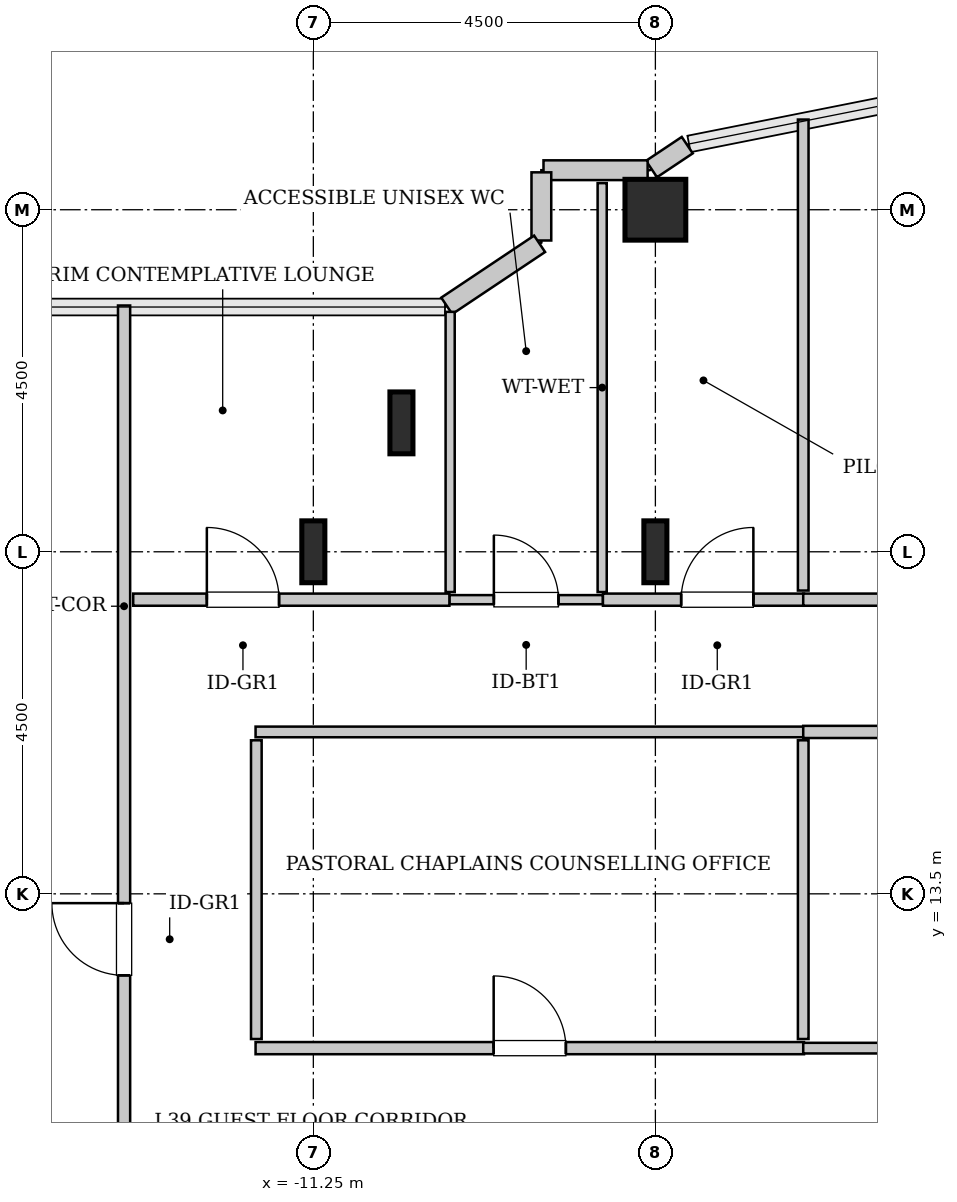
"""IFC4 building model, lengths in metres.
Left out: names, types, materials, properties, quantities, classifications, styles, units other than length and angle.
Written with IfcOpenShell. Run it as: python <this file> out.ifc"""

import sys

from ifc_helpers import new_model, si_unit, direction, frame, frame_2d, origin, origin_2d, place, context, subcontext, project, spatial, rectangle, hollow_rectangle, i_section, extrude, source, transform, mapped, element, fill, save


model = new_model("IFC4")
c1 = context("Model", 3, precision=1e-05, world=origin(), true_north=direction((0.0, 1.0)))
c2 = subcontext(c1, "Body", "Model", "MODEL_VIEW")
j1 = project(units=[si_unit("LENGTHUNIT", "METRE"), si_unit("PLANEANGLEUNIT", "RADIAN")], contexts=[c1])
p1 = place(None, origin())
s1 = spatial("IfcSite", under=j1, at=p1, CompositionType="ELEMENT")
p2 = place(p1, origin())
s2 = spatial("IfcBuilding", under=s1, at=p2, CompositionType="ELEMENT")
p3 = place(p2, frame((0.0, 0.0, 160.2)))
s3 = spatial("IfcBuildingStorey", under=s2, at=p3, CompositionType="ELEMENT", Elevation=160.2)
m1 = source(origin(), c2, "Body", "SweptSolid", [
    extrude(i_section(OverallWidth=0.303, OverallDepth=0.814, WebThickness=0.021, FlangeThickness=0.04, FilletRadius=0.03, at=origin_2d()), origin(), (0.0, 0.0, 1.0), 3.8),
])
for number, where, z_axis, x_axis in (
    (1, (-11.25, 18.0, 0.0), (0.0, 0.0, 1.0), (1.0, 0.0, 0.0)),
    (2, (-10.091, 19.696, 0.0), (0.0, 0.0, 1.0), (1.0, 0.0, 0.0)),
    (3, (-6.75, 18.0, 0.0), (0.0, 0.0, 1.0), (1.0, 0.0, 0.0)),
):
    element("IfcColumn", number, at=place(p3, frame(where, z_axis=z_axis, x_axis=x_axis)), inside=s3, PredefinedType="COLUMN", context=c2, shape_type="MappedRepresentation", body=[
        mapped(m1, transform((0.0, 0.0, 0.0), x_axis=(1.0, 0.0, 0.0), y_axis=(0.0, 1.0, 0.0), z_axis=(0.0, 0.0, 1.0), scale=1.0)),
    ])
m2 = source(origin(), c2, "Body", "SweptSolid", [
    extrude(hollow_rectangle(XDim=0.8, YDim=0.8, WallThickness=0.04, InnerFilletRadius=0.04, OuterFilletRadius=0.08, at=origin_2d()), origin(), (0.0, 0.0, 1.0), 3.8),
])
p4 = place(p3, frame((-6.75, 22.5, 0.0), z_axis=(0.0, 0.0, 1.0), x_axis=(1.0, 0.0, 0.0)))
e4 = element("IfcColumn", 4, at=p4, inside=s3, PredefinedType="COLUMN", context=c2, shape_type="MappedRepresentation", body=[
    mapped(m2, transform((0.0, 0.0, 0.0), x_axis=(1.0, 0.0, 0.0), y_axis=(0.0, 1.0, 0.0), z_axis=(0.0, 0.0, 1.0), scale=1.0)),
])
m3 = source(origin(), c2, "Body", "SweptSolid", [
    extrude(rectangle(XDim=0.565, YDim=0.26, at=frame_2d((0.283, 0.0))), origin(), (0.0, 0.0, 1.0), 3.55),
])
p5 = place(p3, frame((-6.331, 23.35, 0.0), z_axis=(0.0, 0.0, 1.0), x_axis=(-0.831651492666, -0.555297933317, 0.0)))
e5 = element("IfcWall", 5, at=p5, inside=s3, PredefinedType="SOLIDWALL", context=c2, shape_type="MappedRepresentation", body=[
    mapped(m3, transform((0.0, 0.0, 0.0), x_axis=(1.0, 0.0, 0.0), y_axis=(0.0, 1.0, 0.0), z_axis=(0.0, 0.0, 1.0), scale=1.0)),
])
m4 = source(origin(), c2, "Body", "SweptSolid", [
    extrude(rectangle(XDim=1.37, YDim=0.26, at=frame_2d((0.685, 0.0))), origin(), (0.0, 0.0, 1.0), 3.55),
])
p6 = place(p3, frame((-6.852, 23.02, 0.0), z_axis=(0.0, 0.0, 1.0), x_axis=(-1.0, 0.0, 0.0)))
e6 = element("IfcWall", 6, at=p6, inside=s3, PredefinedType="SOLIDWALL", context=c2, shape_type="MappedRepresentation", body=[
    mapped(m4, transform((0.0, 0.0, 0.0), x_axis=(1.0, 0.0, 0.0), y_axis=(0.0, 1.0, 0.0), z_axis=(0.0, 0.0, 1.0), scale=1.0)),
])
m5 = source(origin(), c2, "Body", "SweptSolid", [
    extrude(rectangle(XDim=0.897, YDim=0.26, at=frame_2d((0.448, 0.0))), origin(), (0.0, 0.0, 1.0), 3.55),
])
p7 = place(p3, frame((-8.25, 22.992, 0.0), z_axis=(0.0, 0.0, 1.0), x_axis=(0.0, -1.0, 0.0)))
e7 = element("IfcWall", 7, at=p7, inside=s3, PredefinedType="SOLIDWALL", context=c2, shape_type="MappedRepresentation", body=[
    mapped(m5, transform((0.0, 0.0, 0.0), x_axis=(1.0, 0.0, 0.0), y_axis=(0.0, 1.0, 0.0), z_axis=(0.0, 0.0, 1.0), scale=1.0)),
])
m6 = source(origin(), c2, "Body", "SweptSolid", [
    extrude(rectangle(XDim=1.469, YDim=0.26, at=frame_2d((0.734, 0.0))), origin(), (0.0, 0.0, 1.0), 3.55),
])
p8 = place(p3, frame((-8.273, 22.052, 0.0), z_axis=(0.0, 0.0, 1.0), x_axis=(-0.831461760506, -0.555581983884, 0.0)))
e8 = element("IfcWall", 8, at=p8, inside=s3, PredefinedType="SOLIDWALL", context=c2, shape_type="MappedRepresentation", body=[
    mapped(m6, transform((0.0, 0.0, 0.0), x_axis=(1.0, 0.0, 0.0), y_axis=(0.0, 1.0, 0.0), z_axis=(0.0, 0.0, 1.0), scale=1.0)),
])
m7 = source(origin(), c2, "Body", "SweptSolid", [
    extrude(rectangle(XDim=2.02, YDim=0.12, at=frame_2d((1.01, 0.0))), origin(), (0.0, 0.0, 1.0), 3.535),
])
p9 = place(p3, frame((-9.46, 17.37, 0.0), z_axis=(0.0, 0.0, 1.0), x_axis=(1.0, 0.0, 0.0)))
e9 = element("IfcWall", 9, at=p9, inside=s3, PredefinedType="PLUMBINGWALL", context=c2, shape_type="MappedRepresentation", body=[
    mapped(m7, transform((0.0, 0.0, 0.0), x_axis=(1.0, 0.0, 0.0), y_axis=(0.0, 1.0, 0.0), z_axis=(0.0, 0.0, 1.0), scale=1.0)),
])
p10 = place(p9, frame((0.585, 0.0, 0.0)))
e10 = element("IfcOpeningElement", 10, at=p10, cuts=e9, PredefinedType="OPENING", context=c2, shape_type="SweptSolid", body=[
    extrude(rectangle(XDim=0.85, YDim=2.1, at=frame_2d((0.425, 1.05))), frame((0.0, 0.07, 0.0), z_axis=(0.0, -1.0, 0.0), x_axis=(1.0, 0.0, 0.0)), (0.0, 0.0, 1.0), 0.14),
])
m8 = source(origin(), c2, "Body", "SweptSolid", [
    extrude(rectangle(XDim=5.38, YDim=0.12, at=frame_2d((2.69, 0.0))), origin(), (0.0, 0.0, 1.0), 3.535),
])
p11 = place(p3, frame((-7.45, 17.47, 0.0), z_axis=(0.0, 0.0, 1.0), x_axis=(0.0, 1.0, 0.0)))
e11 = element("IfcWall", 11, at=p11, inside=s3, PredefinedType="PLUMBINGWALL", context=c2, shape_type="MappedRepresentation", body=[
    mapped(m8, transform((0.0, 0.0, 0.0), x_axis=(1.0, 0.0, 0.0), y_axis=(0.0, 1.0, 0.0), z_axis=(0.0, 0.0, 1.0), scale=1.0)),
])
m9 = source(origin(), c2, "Body", "SweptSolid", [
    extrude(rectangle(XDim=3.687, YDim=0.12, at=frame_2d((1.843, 0.0))), origin(), (0.0, 0.0, 1.0), 3.535),
])
p12 = place(p3, frame((-9.45, 17.47, 0.0), z_axis=(0.0, 0.0, 1.0), x_axis=(0.0, 1.0, 0.0)))
e12 = element("IfcWall", 12, at=p12, inside=s3, PredefinedType="PLUMBINGWALL", context=c2, shape_type="MappedRepresentation", body=[
    mapped(m9, transform((0.0, 0.0, 0.0), x_axis=(1.0, 0.0, 0.0), y_axis=(0.0, 1.0, 0.0), z_axis=(0.0, 0.0, 1.0), scale=1.0)),
])
m10 = source(origin(), c2, "Body", "SweptSolid", [
    extrude(rectangle(XDim=12.845, YDim=0.16, at=frame_2d((6.422, 0.0))), origin(), (0.0, 0.0, 1.0), 3.535),
])
p13 = place(p3, frame((-13.74, 8.395, 0.0), z_axis=(0.0, 0.0, 1.0), x_axis=(0.0, 1.0, 0.0)))
e13 = element("IfcWall", 13, at=p13, inside=s3, PredefinedType="PARTITIONING", context=c2, shape_type="MappedRepresentation", body=[
    mapped(m10, transform((0.0, 0.0, 0.0), x_axis=(1.0, 0.0, 0.0), y_axis=(0.0, 1.0, 0.0), z_axis=(0.0, 0.0, 1.0), scale=1.0)),
])
p14 = place(p13, frame((4.032, 0.0, 0.0)))
e14 = element("IfcOpeningElement", 14, at=p14, cuts=e13, PredefinedType="OPENING", context=c2, shape_type="SweptSolid", body=[
    extrude(rectangle(XDim=0.95, YDim=2.1, at=frame_2d((0.475, 1.05))), frame((0.0, 0.09, 0.0), z_axis=(0.0, -1.0, 0.0), x_axis=(1.0, 0.0, 0.0)), (0.0, 0.0, 1.0), 0.18),
])
m11 = source(origin(), c2, "Body", "SweptSolid", [
    extrude(rectangle(XDim=7.215, YDim=0.16, at=frame_2d((3.607, 0.0))), origin(), (0.0, 0.0, 1.0), 3.535),
])
p15 = place(p3, frame((-12.01, 11.47, 0.0), z_axis=(0.0, 0.0, 1.0), x_axis=(1.0, 0.0, 0.0)))
e15 = element("IfcWall", 15, at=p15, inside=s3, PredefinedType="PARTITIONING", context=c2, shape_type="MappedRepresentation", body=[
    mapped(m11, transform((0.0, 0.0, 0.0), x_axis=(1.0, 0.0, 0.0), y_axis=(0.0, 1.0, 0.0), z_axis=(0.0, 0.0, 1.0), scale=1.0)),
])
p16 = place(p15, frame((3.133, 0.0, 0.0)))
e16 = element("IfcOpeningElement", 16, at=p16, cuts=e15, PredefinedType="OPENING", context=c2, shape_type="SweptSolid", body=[
    extrude(rectangle(XDim=0.95, YDim=2.1, at=frame_2d((0.475, 1.05))), frame((0.0, 0.09, 0.0), z_axis=(0.0, -1.0, 0.0), x_axis=(1.0, 0.0, 0.0)), (0.0, 0.0, 1.0), 0.18),
])
m12 = source(origin(), c2, "Body", "SweptSolid", [
    extrude(rectangle(XDim=7.215, YDim=0.14, at=frame_2d((3.607, 0.0))), origin(), (0.0, 0.0, 1.0), 3.535),
])
p17 = place(p3, frame((-12.01, 15.63, 0.0), z_axis=(0.0, 0.0, 1.0), x_axis=(1.0, 0.0, 0.0)))
e17 = element("IfcWall", 17, at=p17, inside=s3, PredefinedType="PARTITIONING", context=c2, shape_type="MappedRepresentation", body=[
    mapped(m12, transform((0.0, 0.0, 0.0), x_axis=(1.0, 0.0, 0.0), y_axis=(0.0, 1.0, 0.0), z_axis=(0.0, 0.0, 1.0), scale=1.0)),
])
m13 = source(origin(), c2, "Body", "SweptSolid", [
    extrude(rectangle(XDim=3.93, YDim=0.14, at=frame_2d((1.965, 0.0))), origin(), (0.0, 0.0, 1.0), 3.535),
])
for number, where, z_axis, x_axis in (
    (18, (-12.0, 11.59, 0.0), (0.0, 0.0, 1.0), (0.0, 1.0, 0.0)),
    (19, (-4.805, 11.59, 0.0), (0.0, 0.0, 1.0), (0.0, 1.0, 0.0)),
):
    element("IfcWall", number, at=place(p3, frame(where, z_axis=z_axis, x_axis=x_axis)), inside=s3, PredefinedType="PARTITIONING", context=c2, shape_type="MappedRepresentation", body=[
        mapped(m13, transform((0.0, 0.0, 0.0), x_axis=(1.0, 0.0, 0.0), y_axis=(0.0, 1.0, 0.0), z_axis=(0.0, 0.0, 1.0), scale=1.0)),
    ])
m14 = source(origin(), c2, "Body", "SweptSolid", [
    extrude(rectangle(XDim=2.645, YDim=0.16, at=frame_2d((1.323, 0.0))), origin(), (0.0, 0.0, 1.0), 3.535),
])
p18 = place(p3, frame((-7.44, 17.37, 0.0), z_axis=(0.0, 0.0, 1.0), x_axis=(1.0, 0.0, 0.0)))
e20 = element("IfcWall", 20, at=p18, inside=s3, PredefinedType="PARTITIONING", context=c2, shape_type="MappedRepresentation", body=[
    mapped(m14, transform((0.0, 0.0, 0.0), x_axis=(1.0, 0.0, 0.0), y_axis=(0.0, 1.0, 0.0), z_axis=(0.0, 0.0, 1.0), scale=1.0)),
])
p19 = place(p18, frame((1.029, 0.0, 0.0)))
e21 = element("IfcOpeningElement", 21, at=p19, cuts=e20, PredefinedType="OPENING", context=c2, shape_type="SweptSolid", body=[
    extrude(rectangle(XDim=0.95, YDim=2.1, at=frame_2d((0.475, 1.05))), frame((0.0, 0.09, 0.0), z_axis=(0.0, -1.0, 0.0), x_axis=(1.0, 0.0, 0.0)), (0.0, 0.0, 1.0), 0.18),
])
m15 = source(origin(), c2, "Body", "SweptSolid", [
    extrude(rectangle(XDim=6.197, YDim=0.14, at=frame_2d((3.098, 0.0))), origin(), (0.0, 0.0, 1.0), 3.535),
])
p20 = place(p3, frame((-4.805, 17.49, 0.0), z_axis=(0.0, 0.0, 1.0), x_axis=(0.0, 1.0, 0.0)))
e22 = element("IfcWall", 22, at=p20, inside=s3, PredefinedType="PARTITIONING", context=c2, shape_type="MappedRepresentation", body=[
    mapped(m15, transform((0.0, 0.0, 0.0), x_axis=(1.0, 0.0, 0.0), y_axis=(0.0, 1.0, 0.0), z_axis=(0.0, 0.0, 1.0), scale=1.0)),
])
m16 = source(origin(), c2, "Body", "SweptSolid", [
    extrude(rectangle(XDim=4.16, YDim=0.16, at=frame_2d((2.08, 0.0))), origin(), (0.0, 0.0, 1.0), 3.535),
])
p21 = place(p3, frame((-13.62, 17.37, 0.0), z_axis=(0.0, 0.0, 1.0), x_axis=(1.0, 0.0, 0.0)))
e23 = element("IfcWall", 23, at=p21, inside=s3, PredefinedType="PARTITIONING", context=c2, shape_type="MappedRepresentation", body=[
    mapped(m16, transform((0.0, 0.0, 0.0), x_axis=(1.0, 0.0, 0.0), y_axis=(0.0, 1.0, 0.0), z_axis=(0.0, 0.0, 1.0), scale=1.0)),
])
p22 = place(p21, frame((0.969, 0.0, 0.0)))
e24 = element("IfcOpeningElement", 24, at=p22, cuts=e23, PredefinedType="OPENING", context=c2, shape_type="SweptSolid", body=[
    extrude(rectangle(XDim=0.95, YDim=2.1, at=frame_2d((0.475, 1.05))), frame((0.0, 0.09, 0.0), z_axis=(0.0, -1.0, 0.0), x_axis=(1.0, 0.0, 0.0)), (0.0, 0.0, 1.0), 0.18),
])
m17 = source(origin(), c2, "Body", "SweptSolid", [
    extrude(rectangle(XDim=11.61, YDim=0.16, at=frame_2d((5.805, 0.0))), origin(), (0.0, 0.0, 1.0), 3.535),
])
p23 = place(p3, frame((-4.805, 17.37, 0.0), z_axis=(0.0, 0.0, 1.0), x_axis=(1.0, 0.0, 0.0)))
e25 = element("IfcWall", 25, at=p23, inside=s3, PredefinedType="PARTITIONING", context=c2, shape_type="MappedRepresentation", body=[
    mapped(m17, transform((0.0, 0.0, 0.0), x_axis=(1.0, 0.0, 0.0), y_axis=(0.0, 1.0, 0.0), z_axis=(0.0, 0.0, 1.0), scale=1.0)),
])
p24 = place(p23, frame((5.33, 0.0, 0.0)))
e26 = element("IfcOpeningElement", 26, at=p24, cuts=e25, PredefinedType="OPENING", context=c2, shape_type="SweptSolid", body=[
    extrude(rectangle(XDim=0.95, YDim=2.1, at=frame_2d((0.475, 1.05))), frame((0.0, 0.09, 0.0), z_axis=(0.0, -1.0, 0.0), x_axis=(1.0, 0.0, 0.0)), (0.0, 0.0, 1.0), 0.18),
])
p25 = place(p3, frame((-4.805, 15.63, 0.0), z_axis=(0.0, 0.0, 1.0), x_axis=(1.0, 0.0, 0.0)))
e27 = element("IfcWall", 27, at=p25, inside=s3, PredefinedType="PARTITIONING", context=c2, shape_type="MappedRepresentation", body=[
    mapped(m17, transform((0.0, 0.0, 0.0), x_axis=(1.0, 0.0, 0.0), y_axis=(0.0, 1.0, 0.0), z_axis=(0.0, 0.0, 1.0), scale=1.0)),
])
p26 = place(p25, frame((5.33, 0.0, 0.0)))
e28 = element("IfcOpeningElement", 28, at=p26, cuts=e27, PredefinedType="OPENING", context=c2, shape_type="SweptSolid", body=[
    extrude(rectangle(XDim=0.95, YDim=2.1, at=frame_2d((0.475, 1.05))), frame((0.0, 0.09, 0.0), z_axis=(0.0, -1.0, 0.0), x_axis=(1.0, 0.0, 0.0)), (0.0, 0.0, 1.0), 0.18),
])
m18 = source(origin(), c2, "Body", "SweptSolid", [
    extrude(rectangle(XDim=11.61, YDim=0.14, at=frame_2d((5.805, 0.0))), origin(), (0.0, 0.0, 1.0), 3.535),
])
p27 = place(p3, frame((-4.805, 11.47, 0.0), z_axis=(0.0, 0.0, 1.0), x_axis=(1.0, 0.0, 0.0)))
e29 = element("IfcWall", 29, at=p27, inside=s3, PredefinedType="PARTITIONING", context=c2, shape_type="MappedRepresentation", body=[
    mapped(m18, transform((0.0, 0.0, 0.0), x_axis=(1.0, 0.0, 0.0), y_axis=(0.0, 1.0, 0.0), z_axis=(0.0, 0.0, 1.0), scale=1.0)),
])
m19 = source(origin(), c2, "Body", "SweptSolid", [
    extrude(rectangle(XDim=0.85, YDim=2.1, at=frame_2d((0.425, 1.05))), frame((0.0, 0.025, 0.0), z_axis=(0.0, -1.0, 0.0), x_axis=(1.0, 0.0, 0.0)), (0.0, 0.0, 1.0), 0.05),
])
p28 = place(p10, origin())
e30 = element("IfcDoor", 30, at=p28, inside=s3, OperationType="SINGLE_SWING_LEFT", PredefinedType="DOOR", context=c2, shape_type="MappedRepresentation", body=[
    mapped(m19, transform((0.0, 0.0, 0.0), x_axis=(1.0, 0.0, 0.0), y_axis=(0.0, 1.0, 0.0), z_axis=(0.0, 0.0, 1.0), scale=1.0)),
])
fill(e10, e30)
m20 = source(origin(), c2, "Body", "SweptSolid", [
    extrude(rectangle(XDim=0.95, YDim=2.1, at=frame_2d((0.475, 1.05))), frame((0.0, 0.025, 0.0), z_axis=(0.0, -1.0, 0.0), x_axis=(1.0, 0.0, 0.0)), (0.0, 0.0, 1.0), 0.05),
])
p29 = place(p14, origin())
e31 = element("IfcDoor", 31, at=p29, inside=s3, OperationType="SINGLE_SWING_RIGHT", PredefinedType="DOOR", context=c2, shape_type="MappedRepresentation", body=[
    mapped(m20, transform((0.0, 0.0, 0.0), x_axis=(1.0, 0.0, 0.0), y_axis=(0.0, 1.0, 0.0), z_axis=(0.0, 0.0, 1.0), scale=1.0)),
])
fill(e14, e31)
p30 = place(p16, origin())
e32 = element("IfcDoor", 32, at=p30, inside=s3, OperationType="SINGLE_SWING_LEFT", PredefinedType="DOOR", context=c2, shape_type="MappedRepresentation", body=[
    mapped(m20, transform((0.0, 0.0, 0.0), x_axis=(1.0, 0.0, 0.0), y_axis=(0.0, 1.0, 0.0), z_axis=(0.0, 0.0, 1.0), scale=1.0)),
])
fill(e16, e32)
p31 = place(p19, origin())
e33 = element("IfcDoor", 33, at=p31, inside=s3, OperationType="SINGLE_SWING_RIGHT", PredefinedType="DOOR", context=c2, shape_type="MappedRepresentation", body=[
    mapped(m20, transform((0.0, 0.0, 0.0), x_axis=(1.0, 0.0, 0.0), y_axis=(0.0, 1.0, 0.0), z_axis=(0.0, 0.0, 1.0), scale=1.0)),
])
fill(e21, e33)
p32 = place(p22, origin())
e34 = element("IfcDoor", 34, at=p32, inside=s3, OperationType="SINGLE_SWING_LEFT", PredefinedType="DOOR", context=c2, shape_type="MappedRepresentation", body=[
    mapped(m20, transform((0.0, 0.0, 0.0), x_axis=(1.0, 0.0, 0.0), y_axis=(0.0, 1.0, 0.0), z_axis=(0.0, 0.0, 1.0), scale=1.0)),
])
fill(e24, e34)
save(model, sys.argv[1])
